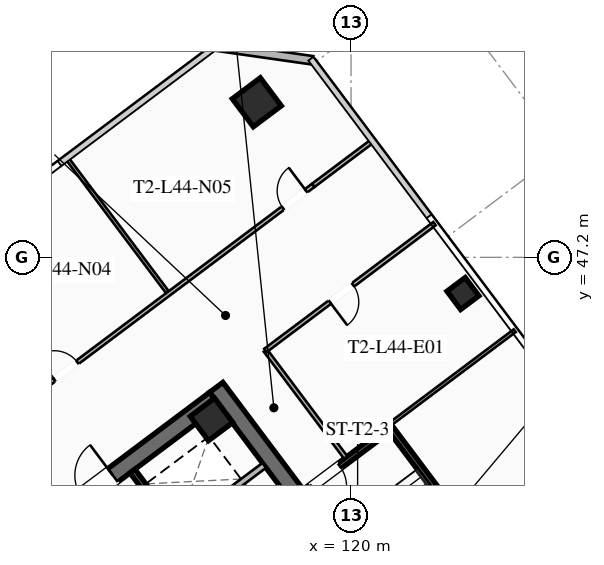
"""IFC4 building model, lengths in metres.
Left out: names, types, materials, properties, quantities, classifications, styles, units other than length and angle.
Written with IfcOpenShell. Run it as: python <this file> out.ifc"""

import sys

from ifc_helpers import new_model, si_unit, direction, frame, frame_2d, origin, origin_2d, place, context, subcontext, project, spatial, rectangle, hollow_rectangle, extrude, element, fill, save


model = new_model("IFC4")
c1 = context("Model", 3, precision=1e-05, world=origin(), true_north=direction((0.0, 1.0)))
c2 = subcontext(c1, "Body", "Model", "MODEL_VIEW")
j1 = project(units=[si_unit("LENGTHUNIT", "METRE"), si_unit("PLANEANGLEUNIT", "RADIAN")], contexts=[c1])
p1 = place(None, origin())
s1 = spatial("IfcSite", under=j1, at=p1, CompositionType="ELEMENT")
p2 = place(p1, origin())
s2 = spatial("IfcBuilding", under=s1, at=p2, CompositionType="ELEMENT")
p3 = place(p2, frame((0.0, 0.0, 164.1)))
s3 = spatial("IfcBuildingStorey", under=s2, at=p3, CompositionType="ELEMENT", Elevation=164.1)
p4 = place(p3, frame((115.564, 42.923, 0.0), z_axis=(0.0, 0.0, 1.0), x_axis=(0.600005007985, -0.799996243986, 0.0)))
e1 = element("IfcWall", 1, at=p4, inside=s3, PredefinedType="SHEAR", context=c2, shape_type="SweptSolid", body=[
    extrude(rectangle(XDim=15.6, YDim=0.55, at=frame_2d((7.8, 0.0))), origin(), (0.0, 0.0, 1.0), 3.55),
])
p5 = place(p3, frame((103.461, 33.502, 0.0), z_axis=(0.0, 0.0, 1.0), x_axis=(0.799998054672, 0.600002593761, 0.0)))
e2 = element("IfcWall", 2, at=p5, inside=s3, PredefinedType="SHEAR", context=c2, shape_type="SweptSolid", body=[
    extrude(rectangle(XDim=15.06, YDim=0.55, at=frame_2d((7.53, 0.0))), origin(), (0.0, 0.0, 1.0), 3.55),
])
p6 = place(p5, frame((4.58, 0.0, 0.0)))
e3 = element("IfcOpeningElement", 3, at=p6, cuts=e2, PredefinedType="OPENING", context=c2, shape_type="SweptSolid", body=[
    extrude(rectangle(XDim=1.25, YDim=2.25, at=frame_2d((0.625, 1.125))), frame((0.0, 0.285, 0.0), z_axis=(0.0, -1.0, 0.0), x_axis=(1.0, 0.0, 0.0)), (0.0, 0.0, 1.0), 0.57),
])
p7 = place(p5, frame((9.63, 0.0, 0.0)))
e4 = element("IfcOpeningElement", 4, at=p7, cuts=e2, PredefinedType="OPENING", context=c2, shape_type="SweptSolid", body=[
    extrude(rectangle(XDim=1.25, YDim=2.25, at=frame_2d((0.625, 1.125))), frame((0.0, 0.285, 0.0), z_axis=(0.0, -1.0, 0.0), x_axis=(1.0, 0.0, 0.0)), (0.0, 0.0, 1.0), 0.57),
])
p8 = place(p3, frame((115.41, 41.87, 0.0), z_axis=(0.0, 0.0, 1.0), x_axis=(0.799999996291, 0.600000004945, 0.0)))
e5 = element("IfcColumn", 5, at=p8, inside=s3, PredefinedType="COLUMN", context=c2, shape_type="SweptSolid", body=[
    extrude(hollow_rectangle(XDim=1.0, YDim=1.0, WallThickness=0.04, at=origin_2d()), origin(), (0.0, 0.0, 1.0), 3.37),
])
p9 = place(p3, frame((116.9, 52.3, 0.0), z_axis=(0.0, 0.0, 1.0), x_axis=(0.799999996291, 0.600000004945, 0.0)))
e6 = element("IfcColumn", 6, at=p9, inside=s3, PredefinedType="COLUMN", context=c2, shape_type="SweptSolid", body=[
    extrude(hollow_rectangle(XDim=1.15, YDim=1.15, WallThickness=0.045, at=origin_2d()), origin(), (0.0, 0.0, 1.0), 3.37),
])
p10 = place(p3, frame((123.68, 46.01, 0.0), z_axis=(0.0, 0.0, 1.0), x_axis=(0.799999996291, 0.600000004945, 0.0)))
e7 = element("IfcColumn", 7, at=p10, inside=s3, PredefinedType="COLUMN", context=c2, shape_type="SweptSolid", body=[
    extrude(hollow_rectangle(XDim=0.75, YDim=0.75, WallThickness=0.032, at=origin_2d()), origin(), (0.0, 0.0, 1.0), 3.37),
])
p11 = place(p3, frame((115.52, 54.14, 0.0), z_axis=(0.0, 0.0, 1.0), x_axis=(0.989950994782, -0.141410847992, 0.0)))
e8 = element("IfcWall", 8, at=p11, inside=s3, PredefinedType="SOLIDWALL", context=c2, shape_type="SweptSolid", body=[
    extrude(rectangle(XDim=3.253, YDim=0.28, at=frame_2d((1.626, 0.0))), origin(), (0.0, 0.0, 1.0), 3.37),
])
p12 = place(p3, frame((112.81, 40.17, 0.0), z_axis=(0.0, 0.0, 1.0), x_axis=(0.599993943644, -0.800004542231, 0.0)))
e9 = element("IfcWall", 9, at=p12, inside=s3, PredefinedType="SHEAR", context=c2, shape_type="SweptSolid", body=[
    extrude(rectangle(XDim=6.45, YDim=0.2, at=frame_2d((3.225, 0.0))), origin(), (0.0, 0.0, 1.0), 3.37),
])
p13 = place(p3, frame((114.36, 38.27, 0.0), z_axis=(0.0, 0.0, 1.0), x_axis=(0.800008418847, 0.599988774707, 0.0)))
e10 = element("IfcWall", 10, at=p13, inside=s3, PredefinedType="SOLIDWALL", context=c2, shape_type="SweptSolid", body=[
    extrude(rectangle(XDim=3.48, YDim=0.2, at=frame_2d((1.74, 0.0))), origin(), (0.0, 0.0, 1.0), 3.37),
])
p14 = place(p3, frame((125.304, 36.228, 0.0), z_axis=(0.0, 0.0, 1.0), x_axis=(-0.59998851072, 0.800008616831, 0.0)))
e11 = element("IfcWall", 11, at=p14, inside=s3, PredefinedType="SHEAR", context=c2, shape_type="SweptSolid", body=[
    extrude(rectangle(XDim=6.8, YDim=0.2, at=frame_2d((3.4, 0.0))), origin(), (0.0, 0.0, 1.0), 3.37),
])
p15 = place(p3, frame((121.204, 41.528, 0.0), z_axis=(0.0, 0.0, 1.0), x_axis=(-0.800017232136, -0.599977023131, 0.0)))
e12 = element("IfcWall", 12, at=p15, inside=s3, PredefinedType="SHEAR", context=c2, shape_type="SweptSolid", body=[
    extrude(rectangle(XDim=3.4, YDim=0.2, at=frame_2d((1.7, 0.0))), origin(), (0.0, 0.0, 1.0), 3.37),
])
p16 = place(p15, frame((1.975, 0.0, 0.0)))
e13 = element("IfcOpeningElement", 13, at=p16, cuts=e12, PredefinedType="OPENING", context=c2, shape_type="SweptSolid", body=[
    extrude(rectangle(XDim=1.15, YDim=2.2, at=frame_2d((0.575, 1.1))), frame((0.0, 0.11, 0.0), z_axis=(0.0, -1.0, 0.0), x_axis=(1.0, 0.0, 0.0)), (0.0, 0.0, 1.0), 0.22),
])
p17 = place(p3, frame((119.824, 40.618, 0.0), z_axis=(0.0, 0.0, 1.0), x_axis=(-0.599982243973, 0.800013316712, 0.0)))
e14 = element("IfcWall", 14, at=p17, inside=s3, PredefinedType="PARTITIONING", context=c2, shape_type="SweptSolid", body=[
    extrude(rectangle(XDim=4.4, YDim=0.135, at=frame_2d((2.2, 0.0))), origin(), (0.0, 0.0, 1.0), 2.723),
])
p18 = place(p3, frame((95.8, 32.35, 0.0), z_axis=(0.0, 0.0, 1.0), x_axis=(0.8, 0.6, 0.0)))
e15 = element("IfcWall", 15, at=p18, inside=s3, PredefinedType="PARTITIONING", context=c2, shape_type="SweptSolid", body=[
    extrude(rectangle(XDim=28.7, YDim=0.135, at=frame_2d((14.35, 0.0))), origin(), (0.0, 0.0, 1.0), 2.723),
])
p19 = place(p18, frame((0.3, 0.0, 0.0)))
e16 = element("IfcOpeningElement", 16, at=p19, cuts=e15, PredefinedType="OPENING", context=c2, shape_type="SweptSolid", body=[
    extrude(rectangle(XDim=0.95, YDim=2.05, at=frame_2d((0.475, 1.025))), frame((0.0, 0.077, 0.0), z_axis=(0.0, -1.0, 0.0), x_axis=(1.0, 0.0, 0.0)), (0.0, 0.0, 1.0), 0.155),
])
p20 = place(p18, frame((9.959, 0.0, 0.0)))
e17 = element("IfcOpeningElement", 17, at=p20, cuts=e15, PredefinedType="OPENING", context=c2, shape_type="SweptSolid", body=[
    extrude(rectangle(XDim=0.95, YDim=2.05, at=frame_2d((0.475, 1.025))), frame((0.0, 0.077, 0.0), z_axis=(0.0, -1.0, 0.0), x_axis=(1.0, 0.0, 0.0)), (0.0, 0.0, 1.0), 0.155),
])
p21 = place(p18, frame((14.005, 0.0, 0.0)))
e18 = element("IfcOpeningElement", 18, at=p21, cuts=e15, PredefinedType="OPENING", context=c2, shape_type="SweptSolid", body=[
    extrude(rectangle(XDim=0.95, YDim=2.05, at=frame_2d((0.475, 1.025))), frame((0.0, 0.077, 0.0), z_axis=(0.0, -1.0, 0.0), x_axis=(1.0, 0.0, 0.0)), (0.0, 0.0, 1.0), 0.155),
])
p22 = place(p18, frame((18.049, 0.0, 0.0)))
e19 = element("IfcOpeningElement", 19, at=p22, cuts=e15, PredefinedType="OPENING", context=c2, shape_type="SweptSolid", body=[
    extrude(rectangle(XDim=0.95, YDim=2.05, at=frame_2d((0.475, 1.025))), frame((0.0, 0.077, 0.0), z_axis=(0.0, -1.0, 0.0), x_axis=(1.0, 0.0, 0.0)), (0.0, 0.0, 1.0), 0.155),
])
p23 = place(p18, frame((27.45, 0.0, 0.0)))
e20 = element("IfcOpeningElement", 20, at=p23, cuts=e15, PredefinedType="OPENING", context=c2, shape_type="SweptSolid", body=[
    extrude(rectangle(XDim=0.95, YDim=2.05, at=frame_2d((0.475, 1.025))), frame((0.0, 0.077, 0.0), z_axis=(0.0, -1.0, 0.0), x_axis=(1.0, 0.0, 0.0)), (0.0, 0.0, 1.0), 0.155),
])
p24 = place(p3, frame((118.76, 49.57, 0.0), z_axis=(0.0, 0.0, 1.0), x_axis=(0.800012055778, 0.599983925293, 0.0)))
e21 = element("IfcWall", 21, at=p24, inside=s3, PredefinedType="PARTITIONING", context=c2, shape_type="SweptSolid", body=[
    extrude(rectangle(XDim=2.43, YDim=0.135, at=frame_2d((1.215, 0.0))), origin(), (0.0, 0.0, 1.0), 2.723),
])
p25 = place(p3, frame((113.952, 46.064, 0.0), z_axis=(0.0, 0.0, 1.0), x_axis=(-0.599964488045, 0.800026632735, 0.0)))
e22 = element("IfcWall", 22, at=p25, inside=s3, PredefinedType="PARTITIONING", context=c2, shape_type="SweptSolid", body=[
    extrude(rectangle(XDim=5.5, YDim=0.11, at=frame_2d((2.75, 0.0))), origin(), (0.0, 0.0, 1.0), 2.723),
])
p26 = place(p3, frame((122.744, 48.308, 0.0), z_axis=(0.0, 0.0, 1.0), x_axis=(-0.79997892247, -0.600028102345, 0.0)))
e23 = element("IfcWall", 23, at=p26, inside=s3, PredefinedType="PARTITIONING", context=c2, shape_type="SweptSolid", body=[
    extrude(rectangle(XDim=6.95, YDim=0.135, at=frame_2d((3.475, 0.0))), origin(), (0.0, 0.0, 1.0), 2.723),
])
p27 = place(p26, frame((3.35, 0.0, 0.0)))
e24 = element("IfcOpeningElement", 24, at=p27, cuts=e23, PredefinedType="OPENING", context=c2, shape_type="SweptSolid", body=[
    extrude(rectangle(XDim=0.95, YDim=2.05, at=frame_2d((0.475, 1.025))), frame((0.0, 0.077, 0.0), z_axis=(0.0, -1.0, 0.0), x_axis=(1.0, 0.0, 0.0)), (0.0, 0.0, 1.0), 0.155),
])
p28 = place(p3, frame((125.384, 44.788, 0.0), z_axis=(0.0, 0.0, 1.0), x_axis=(-0.8, -0.6, 0.0)))
e25 = element("IfcWall", 25, at=p28, inside=s3, PredefinedType="PARTITIONING", context=c2, shape_type="SweptSolid", body=[
    extrude(rectangle(XDim=5.1, YDim=0.11, at=frame_2d((2.55, 0.0))), origin(), (0.0, 0.0, 1.0), 2.723),
])
p29 = place(p7, origin())
e26 = element("IfcDoor", 26, at=p29, inside=s3, OperationType="SINGLE_SWING_RIGHT", PredefinedType="DOOR", context=c2, shape_type="SweptSolid", body=[
    extrude(rectangle(XDim=1.25, YDim=2.25, at=frame_2d((0.625, 1.125))), frame((0.0, 0.025, 0.0), z_axis=(0.0, -1.0, 0.0), x_axis=(1.0, 0.0, 0.0)), (0.0, 0.0, 1.0), 0.05),
])
fill(e4, e26)
p30 = place(p16, origin())
e27 = element("IfcDoor", 27, at=p30, inside=s3, OperationType="SINGLE_SWING_RIGHT", PredefinedType="DOOR", context=c2, shape_type="SweptSolid", body=[
    extrude(rectangle(XDim=1.15, YDim=2.2, at=frame_2d((0.575, 1.1))), frame((0.0, 0.025, 0.0), z_axis=(0.0, -1.0, 0.0), x_axis=(1.0, 0.0, 0.0)), (0.0, 0.0, 1.0), 0.05),
])
fill(e13, e27)
p31 = place(p22, origin())
e28 = element("IfcDoor", 28, at=p31, inside=s3, OperationType="SINGLE_SWING_LEFT", PredefinedType="DOOR", context=c2, shape_type="SweptSolid", body=[
    extrude(rectangle(XDim=0.95, YDim=2.05, at=frame_2d((0.475, 1.025))), frame((0.0, 0.025, 0.0), z_axis=(0.0, -1.0, 0.0), x_axis=(1.0, 0.0, 0.0)), (0.0, 0.0, 1.0), 0.05),
])
fill(e19, e28)
p32 = place(p23, origin())
e29 = element("IfcDoor", 29, at=p32, inside=s3, OperationType="SINGLE_SWING_RIGHT", PredefinedType="DOOR", context=c2, shape_type="SweptSolid", body=[
    extrude(rectangle(XDim=0.95, YDim=2.05, at=frame_2d((0.475, 1.025))), frame((0.0, 0.025, 0.0), z_axis=(0.0, -1.0, 0.0), x_axis=(1.0, 0.0, 0.0)), (0.0, 0.0, 1.0), 0.05),
])
fill(e20, e29)
p33 = place(p27, origin())
e30 = element("IfcDoor", 30, at=p33, inside=s3, OperationType="SINGLE_SWING_RIGHT", PredefinedType="DOOR", context=c2, shape_type="SweptSolid", body=[
    extrude(rectangle(XDim=0.95, YDim=2.05, at=frame_2d((0.475, 1.025))), frame((0.0, 0.025, 0.0), z_axis=(0.0, -1.0, 0.0), x_axis=(1.0, 0.0, 0.0)), (0.0, 0.0, 1.0), 0.05),
])
fill(e24, e30)
save(model, sys.argv[1])
